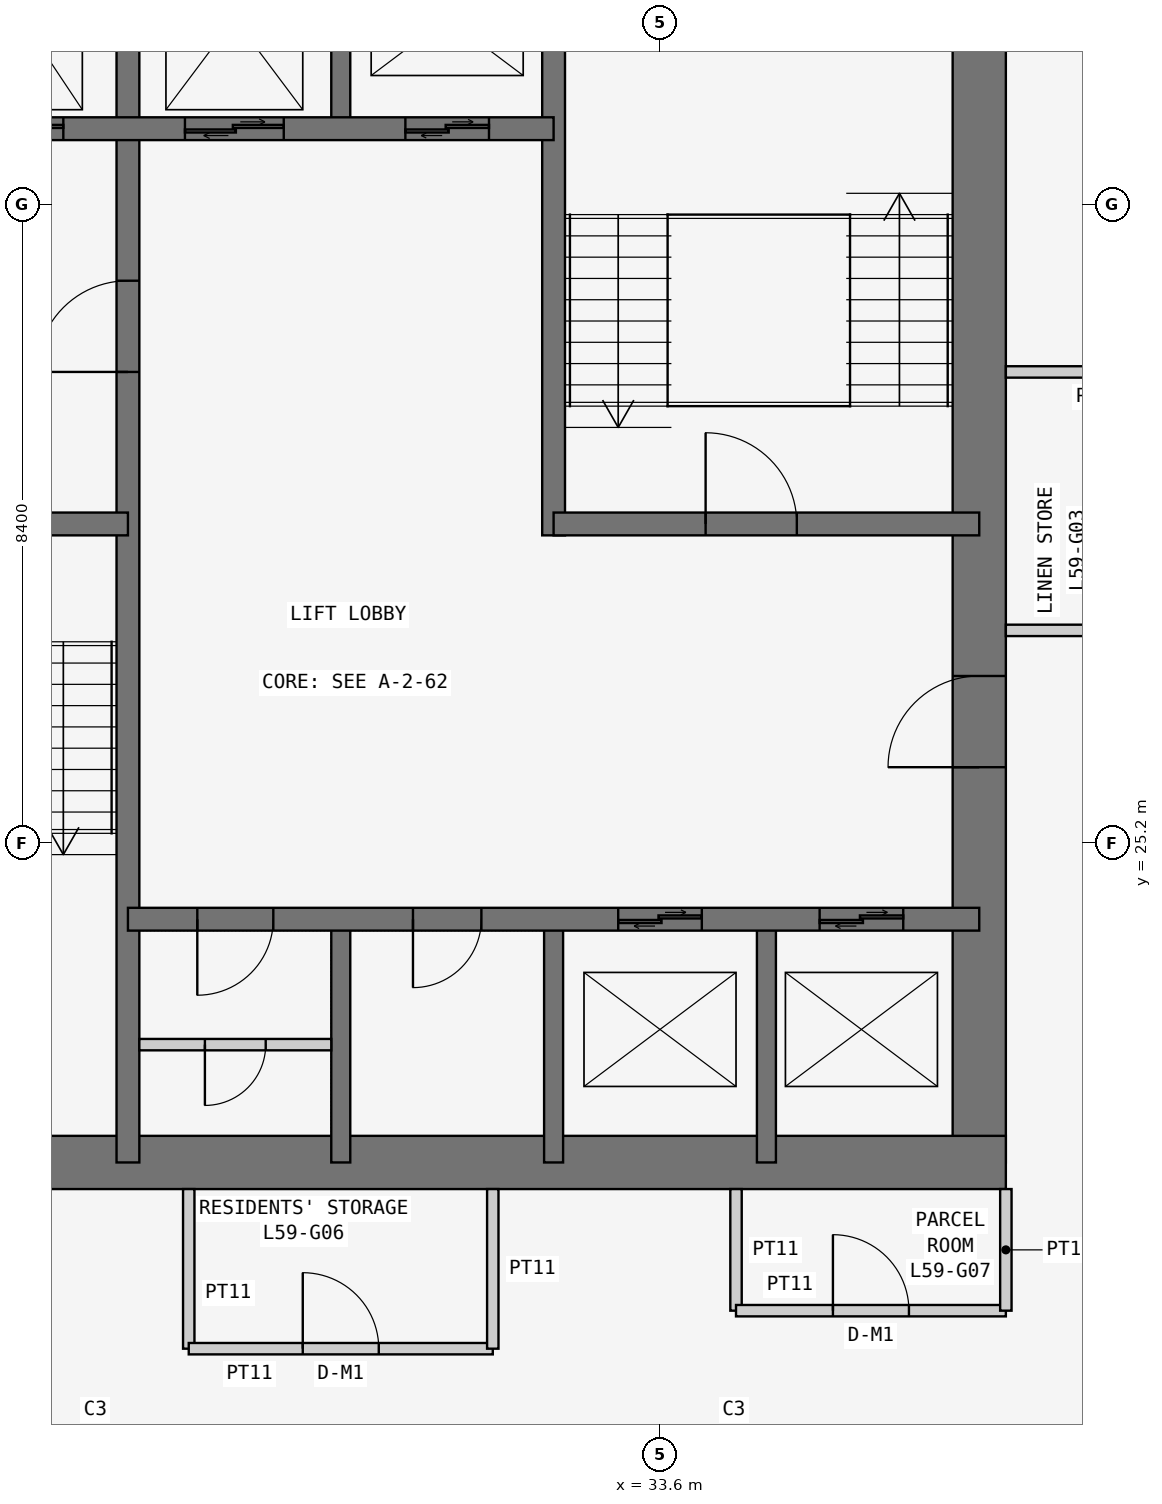
"""IFC4 building model, lengths in metres.
Left out: names, types, materials, properties, quantities, classifications, styles, units other than length and angle.
Written with IfcOpenShell. Run it as: python <this file> out.ifc"""

import sys

from ifc_helpers import new_model, si_unit, direction, frame, frame_2d, origin, place, context, subcontext, project, spatial, rectangle, extrude, element, fill, save


model = new_model("IFC4")
c1 = context("Model", 3, precision=1e-05, world=origin(), true_north=direction((0.0, 1.0)))
c2 = subcontext(c1, "Body", "Model", "MODEL_VIEW")
j1 = project(units=[si_unit("LENGTHUNIT", "METRE"), si_unit("PLANEANGLEUNIT", "RADIAN")], contexts=[c1])
p1 = place(None, origin())
s1 = spatial("IfcSite", under=j1, at=p1, CompositionType="ELEMENT")
p2 = place(p1, origin())
s2 = spatial("IfcBuilding", under=s1, at=p2, CompositionType="ELEMENT")
p3 = place(p2, frame((0.0, 0.0, 226.5)))
s3 = spatial("IfcBuildingStorey", under=s2, at=p3, CompositionType="ELEMENT", Elevation=226.5)
p4 = place(p3, frame((21.0, 21.0, 0.0), z_axis=(0.0, 0.0, 1.0), x_axis=(1.0, 0.0, 0.0)))
e1 = element("IfcWall", 1, at=p4, inside=s3, PredefinedType="SHEAR", context=c2, shape_type="SweptSolid", body=[
    extrude(rectangle(XDim=17.15, YDim=0.7, at=frame_2d((8.575, 0.0))), origin(), (0.0, 0.0, 1.0), 3.6),
])
p5 = place(p3, frame((37.8, 21.0, 0.0), z_axis=(0.0, 0.0, 1.0), x_axis=(0.0, 1.0, 0.0)))
e2 = element("IfcWall", 2, at=p5, inside=s3, PredefinedType="SHEAR", context=c2, shape_type="SweptSolid", body=[
    extrude(rectangle(XDim=17.15, YDim=0.7, at=frame_2d((8.575, 0.0))), origin(), (0.0, 0.0, 1.0), 3.6),
])
p6 = place(p5, frame((5.2, 0.0, 0.0)))
e3 = element("IfcOpeningElement", 3, at=p6, cuts=e2, PredefinedType="OPENING", context=c2, shape_type="SweptSolid", body=[
    extrude(rectangle(XDim=1.2, YDim=2.1, at=frame_2d((0.6, 1.05))), frame((0.0, 0.36, 0.0), z_axis=(0.0, -1.0, 0.0), x_axis=(1.0, 0.0, 0.0)), (0.0, 0.0, 1.0), 0.72),
])
p7 = place(p3, frame((26.6, 21.0, 0.0), z_axis=(0.0, 0.0, 1.0), x_axis=(0.0, 1.0, 0.0)))
e4 = element("IfcWall", 4, at=p7, inside=s3, PredefinedType="SHEAR", context=c2, shape_type="SweptSolid", body=[
    extrude(rectangle(XDim=16.8, YDim=0.3, at=frame_2d((8.4, 0.0))), origin(), (0.0, 0.0, 1.0), 3.6),
])
p8 = place(p7, frame((10.4, 0.0, 0.0)))
e5 = element("IfcOpeningElement", 5, at=p8, cuts=e4, PredefinedType="OPENING", context=c2, shape_type="SweptSolid", body=[
    extrude(rectangle(XDim=1.2, YDim=2.1, at=frame_2d((0.6, 1.05))), frame((0.0, 0.16, 0.0), z_axis=(0.0, -1.0, 0.0), x_axis=(1.0, 0.0, 0.0)), (0.0, 0.0, 1.0), 0.32),
])
p9 = place(p3, frame((21.0, 29.4, 0.0), z_axis=(0.0, 0.0, 1.0), x_axis=(1.0, 0.0, 0.0)))
e6 = element("IfcWall", 6, at=p9, inside=s3, PredefinedType="SHEAR", context=c2, shape_type="SweptSolid", body=[
    extrude(rectangle(XDim=5.6, YDim=0.3, at=frame_2d((2.8, 0.0))), origin(), (0.0, 0.0, 1.0), 3.6),
])
p10 = place(p9, frame((2.3, 0.0, 0.0)))
e7 = element("IfcOpeningElement", 7, at=p10, cuts=e6, PredefinedType="OPENING", context=c2, shape_type="SweptSolid", body=[
    extrude(rectangle(XDim=1.2, YDim=2.1, at=frame_2d((0.6, 1.05))), frame((0.0, 0.16, 0.0), z_axis=(0.0, -1.0, 0.0), x_axis=(1.0, 0.0, 0.0)), (0.0, 0.0, 1.0), 0.32),
])
p11 = place(p3, frame((21.0, 34.6, 0.0), z_axis=(0.0, 0.0, 1.0), x_axis=(1.0, 0.0, 0.0)))
e8 = element("IfcWall", 8, at=p11, inside=s3, PredefinedType="SHEAR", context=c2, shape_type="SweptSolid", body=[
    extrude(rectangle(XDim=11.2, YDim=0.3, at=frame_2d((5.6, 0.0))), origin(), (0.0, 0.0, 1.0), 3.6),
])
p12 = place(p11, frame((9.25, 0.0, 0.0)))
e9 = element("IfcOpeningElement", 9, at=p12, cuts=e8, PredefinedType="OPENING", context=c2, shape_type="SweptSolid", body=[
    extrude(rectangle(XDim=1.1, YDim=2.1, at=frame_2d((0.55, 1.05))), frame((0.0, 0.16, 0.0), z_axis=(0.0, -1.0, 0.0), x_axis=(1.0, 0.0, 0.0)), (0.0, 0.0, 1.0), 0.32),
])
p13 = place(p11, frame((1.0, 0.0, 0.0)))
e10 = element("IfcOpeningElement", 10, at=p13, cuts=e8, PredefinedType="OPENING", context=c2, shape_type="SweptSolid", body=[
    extrude(rectangle(XDim=1.1, YDim=2.1, at=frame_2d((0.55, 1.05))), frame((0.0, 0.16, 0.0), z_axis=(0.0, -1.0, 0.0), x_axis=(1.0, 0.0, 0.0)), (0.0, 0.0, 1.0), 0.32),
])
p14 = place(p11, frame((3.65, 0.0, 0.0)))
e11 = element("IfcOpeningElement", 11, at=p14, cuts=e8, PredefinedType="OPENING", context=c2, shape_type="SweptSolid", body=[
    extrude(rectangle(XDim=1.1, YDim=2.1, at=frame_2d((0.55, 1.05))), frame((0.0, 0.16, 0.0), z_axis=(0.0, -1.0, 0.0), x_axis=(1.0, 0.0, 0.0)), (0.0, 0.0, 1.0), 0.32),
])
p15 = place(p11, frame((6.35, 0.0, 0.0)))
e12 = element("IfcOpeningElement", 12, at=p15, cuts=e8, PredefinedType="OPENING", context=c2, shape_type="SweptSolid", body=[
    extrude(rectangle(XDim=1.3, YDim=2.1, at=frame_2d((0.65, 1.05))), frame((0.0, 0.16, 0.0), z_axis=(0.0, -1.0, 0.0), x_axis=(1.0, 0.0, 0.0)), (0.0, 0.0, 1.0), 0.32),
])
p16 = place(p3, frame((26.6, 24.2, 0.0), z_axis=(0.0, 0.0, 1.0), x_axis=(1.0, 0.0, 0.0)))
e13 = element("IfcWall", 13, at=p16, inside=s3, PredefinedType="SHEAR", context=c2, shape_type="SweptSolid", body=[
    extrude(rectangle(XDim=11.2, YDim=0.3, at=frame_2d((5.6, 0.0))), origin(), (0.0, 0.0, 1.0), 3.6),
])
p17 = place(p16, frame((0.913, 0.0, 0.0)))
e14 = element("IfcOpeningElement", 14, at=p17, cuts=e13, PredefinedType="OPENING", context=c2, shape_type="SweptSolid", body=[
    extrude(rectangle(XDim=1.0, YDim=2.1, at=frame_2d((0.5, 1.05))), frame((0.0, 0.16, 0.0), z_axis=(0.0, -1.0, 0.0), x_axis=(1.0, 0.0, 0.0)), (0.0, 0.0, 1.0), 0.32),
])
p18 = place(p16, frame((3.75, 0.0, 0.0)))
e15 = element("IfcOpeningElement", 15, at=p18, cuts=e13, PredefinedType="OPENING", context=c2, shape_type="SweptSolid", body=[
    extrude(rectangle(XDim=0.9, YDim=2.1, at=frame_2d((0.45, 1.05))), frame((0.0, 0.16, 0.0), z_axis=(0.0, -1.0, 0.0), x_axis=(1.0, 0.0, 0.0)), (0.0, 0.0, 1.0), 0.32),
])
p19 = place(p16, frame((6.45, 0.0, 0.0)))
e16 = element("IfcOpeningElement", 16, at=p19, cuts=e13, PredefinedType="OPENING", context=c2, shape_type="SweptSolid", body=[
    extrude(rectangle(XDim=1.1, YDim=2.1, at=frame_2d((0.55, 1.05))), frame((0.0, 0.16, 0.0), z_axis=(0.0, -1.0, 0.0), x_axis=(1.0, 0.0, 0.0)), (0.0, 0.0, 1.0), 0.32),
])
p20 = place(p16, frame((9.1, 0.0, 0.0)))
e17 = element("IfcOpeningElement", 17, at=p20, cuts=e13, PredefinedType="OPENING", context=c2, shape_type="SweptSolid", body=[
    extrude(rectangle(XDim=1.1, YDim=2.1, at=frame_2d((0.55, 1.05))), frame((0.0, 0.16, 0.0), z_axis=(0.0, -1.0, 0.0), x_axis=(1.0, 0.0, 0.0)), (0.0, 0.0, 1.0), 0.32),
])
p21 = place(p3, frame((32.2, 29.25, 0.0), z_axis=(0.0, 0.0, 1.0), x_axis=(0.0, 1.0, 0.0)))
e18 = element("IfcWall", 18, at=p21, inside=s3, PredefinedType="SHEAR", context=c2, shape_type="SweptSolid", body=[
    extrude(rectangle(XDim=8.55, YDim=0.3, at=frame_2d((4.275, 0.0))), origin(), (0.0, 0.0, 1.0), 3.6),
])
p22 = place(p3, frame((32.2, 29.4, 0.0), z_axis=(0.0, 0.0, 1.0), x_axis=(1.0, 0.0, 0.0)))
e19 = element("IfcWall", 19, at=p22, inside=s3, PredefinedType="SHEAR", context=c2, shape_type="SweptSolid", body=[
    extrude(rectangle(XDim=5.6, YDim=0.3, at=frame_2d((2.8, 0.0))), origin(), (0.0, 0.0, 1.0), 3.6),
])
p23 = place(p22, frame((2.0, 0.0, 0.0)))
e20 = element("IfcOpeningElement", 20, at=p23, cuts=e19, PredefinedType="OPENING", context=c2, shape_type="SweptSolid", body=[
    extrude(rectangle(XDim=1.2, YDim=2.1, at=frame_2d((0.6, 1.05))), frame((0.0, 0.16, 0.0), z_axis=(0.0, -1.0, 0.0), x_axis=(1.0, 0.0, 0.0)), (0.0, 0.0, 1.0), 0.32),
])
for number, where, z_axis, x_axis in (
    (21, (29.4, 21.0, 0.0), (0.0, 0.0, 1.0), (0.0, 1.0, 0.0)),
    (22, (32.2, 21.0, 0.0), (0.0, 0.0, 1.0), (0.0, 1.0, 0.0)),
    (23, (35.0, 21.0, 0.0), (0.0, 0.0, 1.0), (0.0, 1.0, 0.0)),
    (24, (29.4, 34.6, 0.0), (0.0, 0.0, 1.0), (0.0, 1.0, 0.0)),
):
    element("IfcWall", number, at=place(p3, frame(where, z_axis=z_axis, x_axis=x_axis)), inside=s3, PredefinedType="SHEAR", context=c2, shape_type="SweptSolid", body=[
        extrude(rectangle(XDim=3.2, YDim=0.25, at=frame_2d((1.6, 0.0))), origin(), (0.0, 0.0, 1.0), 3.6),
    ])
for number, where, z_axis, x_axis in (
    (25, (38.15, 28.0, 0.0), (0.0, 0.0, 1.0), (1.0, 0.0, 0.0)),
    (26, (40.6, 31.4, 0.0), (0.0, 0.0, 1.0), (-1.0, 0.0, 0.0)),
):
    element("IfcWall", number, at=place(p3, frame(where, z_axis=z_axis, x_axis=x_axis)), inside=s3, PredefinedType="PARTITIONING", context=c2, shape_type="SweptSolid", body=[
        extrude(rectangle(XDim=2.45, YDim=0.15, at=frame_2d((1.225, 0.0))), origin(), (0.0, 0.0, 1.0), 3.45),
    ])
p24 = place(p3, frame((27.4, 20.65, 0.0), z_axis=(0.0, 0.0, 1.0), x_axis=(0.0, -1.0, 0.0)))
e27 = element("IfcWall", 27, at=p24, inside=s3, PredefinedType="PARTITIONING", context=c2, shape_type="SweptSolid", body=[
    extrude(rectangle(XDim=2.1, YDim=0.15, at=frame_2d((1.05, 0.0))), origin(), (0.0, 0.0, 1.0), 3.45),
])
p25 = place(p3, frame((27.4, 18.55, 0.0), z_axis=(0.0, 0.0, 1.0), x_axis=(1.0, 0.0, 0.0)))
e28 = element("IfcWall", 28, at=p25, inside=s3, PredefinedType="PARTITIONING", context=c2, shape_type="SweptSolid", body=[
    extrude(rectangle(XDim=4.0, YDim=0.15, at=frame_2d((2.0, 0.0))), origin(), (0.0, 0.0, 1.0), 3.45),
])
p26 = place(p25, frame((1.5, 0.0, 0.0)))
e29 = element("IfcOpeningElement", 29, at=p26, cuts=e28, PredefinedType="OPENING", context=c2, shape_type="SweptSolid", body=[
    extrude(rectangle(XDim=1.0, YDim=2.1, at=frame_2d((0.5, 1.05))), frame((0.0, 0.085, 0.0), z_axis=(0.0, -1.0, 0.0), x_axis=(1.0, 0.0, 0.0)), (0.0, 0.0, 1.0), 0.17),
])
p27 = place(p3, frame((31.4, 18.55, 0.0), z_axis=(0.0, 0.0, 1.0), x_axis=(0.0, 1.0, 0.0)))
e30 = element("IfcWall", 30, at=p27, inside=s3, PredefinedType="PARTITIONING", context=c2, shape_type="SweptSolid", body=[
    extrude(rectangle(XDim=2.1, YDim=0.15, at=frame_2d((1.05, 0.0))), origin(), (0.0, 0.0, 1.0), 3.45),
])
p28 = place(p3, frame((34.6, 20.65, 0.0), z_axis=(0.0, 0.0, 1.0), x_axis=(0.0, -1.0, 0.0)))
e31 = element("IfcWall", 31, at=p28, inside=s3, PredefinedType="PARTITIONING", context=c2, shape_type="SweptSolid", body=[
    extrude(rectangle(XDim=1.6, YDim=0.15, at=frame_2d((0.8, 0.0))), origin(), (0.0, 0.0, 1.0), 3.45),
])
p29 = place(p3, frame((34.6, 19.05, 0.0), z_axis=(0.0, 0.0, 1.0), x_axis=(1.0, 0.0, 0.0)))
e32 = element("IfcWall", 32, at=p29, inside=s3, PredefinedType="PARTITIONING", context=c2, shape_type="SweptSolid", body=[
    extrude(rectangle(XDim=3.55, YDim=0.15, at=frame_2d((1.775, 0.0))), origin(), (0.0, 0.0, 1.0), 3.45),
])
p30 = place(p29, frame((1.275, 0.0, 0.0)))
e33 = element("IfcOpeningElement", 33, at=p30, cuts=e32, PredefinedType="OPENING", context=c2, shape_type="SweptSolid", body=[
    extrude(rectangle(XDim=1.0, YDim=2.1, at=frame_2d((0.5, 1.05))), frame((0.0, 0.085, 0.0), z_axis=(0.0, -1.0, 0.0), x_axis=(1.0, 0.0, 0.0)), (0.0, 0.0, 1.0), 0.17),
])
p31 = place(p3, frame((38.15, 19.05, 0.0), z_axis=(0.0, 0.0, 1.0), x_axis=(0.0, 1.0, 0.0)))
e34 = element("IfcWall", 34, at=p31, inside=s3, PredefinedType="PARTITIONING", context=c2, shape_type="SweptSolid", body=[
    extrude(rectangle(XDim=1.6, YDim=0.15, at=frame_2d((0.8, 0.0))), origin(), (0.0, 0.0, 1.0), 3.45),
])
p32 = place(p3, frame((26.75, 22.55, 0.0), z_axis=(0.0, 0.0, 1.0), x_axis=(1.0, 0.0, 0.0)))
e35 = element("IfcWall", 35, at=p32, inside=s3, PredefinedType="PARTITIONING", context=c2, shape_type="SweptSolid", body=[
    extrude(rectangle(XDim=2.525, YDim=0.15, at=frame_2d((1.262, 0.0))), origin(), (0.0, 0.0, 1.0), 3.45),
])
p33 = place(p32, frame((0.863, 0.0, 0.0)))
e36 = element("IfcOpeningElement", 36, at=p33, cuts=e35, PredefinedType="OPENING", context=c2, shape_type="SweptSolid", body=[
    extrude(rectangle(XDim=0.8, YDim=2.1, at=frame_2d((0.4, 1.05))), frame((0.0, 0.085, 0.0), z_axis=(0.0, -1.0, 0.0), x_axis=(1.0, 0.0, 0.0)), (0.0, 0.0, 1.0), 0.17),
])
p34 = place(p26, origin())
e37 = element("IfcDoor", 37, at=p34, inside=s3, OperationType="SINGLE_SWING_LEFT", PredefinedType="DOOR", context=c2, shape_type="SweptSolid", body=[
    extrude(rectangle(XDim=1.0, YDim=2.1, at=frame_2d((0.5, 1.05))), frame((0.0, 0.025, 0.0), z_axis=(0.0, -1.0, 0.0), x_axis=(1.0, 0.0, 0.0)), (0.0, 0.0, 1.0), 0.05),
])
fill(e29, e37)
p35 = place(p30, origin())
e38 = element("IfcDoor", 38, at=p35, inside=s3, OperationType="SINGLE_SWING_LEFT", PredefinedType="DOOR", context=c2, shape_type="SweptSolid", body=[
    extrude(rectangle(XDim=1.0, YDim=2.1, at=frame_2d((0.5, 1.05))), frame((0.0, 0.025, 0.0), z_axis=(0.0, -1.0, 0.0), x_axis=(1.0, 0.0, 0.0)), (0.0, 0.0, 1.0), 0.05),
])
fill(e33, e38)
p36 = place(p8, origin())
e39 = element("IfcDoor", 39, at=p36, inside=s3, OperationType="SINGLE_SWING_LEFT", PredefinedType="DOOR", context=c2, shape_type="SweptSolid", body=[
    extrude(rectangle(XDim=1.2, YDim=2.1, at=frame_2d((0.6, 1.05))), frame((0.0, 0.025, 0.0), z_axis=(0.0, -1.0, 0.0), x_axis=(1.0, 0.0, 0.0)), (0.0, 0.0, 1.0), 0.05),
])
fill(e5, e39)
p37 = place(p6, origin())
e40 = element("IfcDoor", 40, at=p37, inside=s3, OperationType="SINGLE_SWING_LEFT", PredefinedType="DOOR", context=c2, shape_type="SweptSolid", body=[
    extrude(rectangle(XDim=1.2, YDim=2.1, at=frame_2d((0.6, 1.05))), frame((0.0, 0.025, 0.0), z_axis=(0.0, -1.0, 0.0), x_axis=(1.0, 0.0, 0.0)), (0.0, 0.0, 1.0), 0.05),
])
fill(e3, e40)
p38 = place(p23, origin())
e41 = element("IfcDoor", 41, at=p38, inside=s3, OperationType="SINGLE_SWING_LEFT", PredefinedType="DOOR", context=c2, shape_type="SweptSolid", body=[
    extrude(rectangle(XDim=1.2, YDim=2.1, at=frame_2d((0.6, 1.05))), frame((0.0, 0.025, 0.0), z_axis=(0.0, -1.0, 0.0), x_axis=(1.0, 0.0, 0.0)), (0.0, 0.0, 1.0), 0.05),
])
fill(e20, e41)
p39 = place(p17, frame((1.0, 0.0, 0.0), z_axis=(0.0, 0.0, 1.0), x_axis=(-1.0, 0.0, 0.0)))
e42 = element("IfcDoor", 42, at=p39, inside=s3, OperationType="SINGLE_SWING_RIGHT", PredefinedType="DOOR", context=c2, shape_type="SweptSolid", body=[
    extrude(rectangle(XDim=1.0, YDim=2.1, at=frame_2d((0.5, 1.05))), frame((0.0, 0.025, 0.0), z_axis=(0.0, -1.0, 0.0), x_axis=(1.0, 0.0, 0.0)), (0.0, 0.0, 1.0), 0.05),
])
fill(e14, e42)
p40 = place(p33, frame((0.8, 0.0, 0.0), z_axis=(0.0, 0.0, 1.0), x_axis=(-1.0, 0.0, 0.0)))
e43 = element("IfcDoor", 43, at=p40, inside=s3, OperationType="SINGLE_SWING_RIGHT", PredefinedType="DOOR", context=c2, shape_type="SweptSolid", body=[
    extrude(rectangle(XDim=0.8, YDim=2.1, at=frame_2d((0.4, 1.05))), frame((0.0, 0.025, 0.0), z_axis=(0.0, -1.0, 0.0), x_axis=(1.0, 0.0, 0.0)), (0.0, 0.0, 1.0), 0.05),
])
fill(e36, e43)
p41 = place(p18, frame((0.9, 0.0, 0.0), z_axis=(0.0, 0.0, 1.0), x_axis=(-1.0, 0.0, 0.0)))
e44 = element("IfcDoor", 44, at=p41, inside=s3, OperationType="SINGLE_SWING_RIGHT", PredefinedType="DOOR", context=c2, shape_type="SweptSolid", body=[
    extrude(rectangle(XDim=0.9, YDim=2.1, at=frame_2d((0.45, 1.05))), frame((0.0, 0.025, 0.0), z_axis=(0.0, -1.0, 0.0), x_axis=(1.0, 0.0, 0.0)), (0.0, 0.0, 1.0), 0.05),
])
fill(e15, e44)
p42 = place(p19, origin())
e45 = element("IfcDoor", 45, at=p42, inside=s3, OperationType="DOUBLE_DOOR_SLIDING", PredefinedType="DOOR", context=c2, shape_type="SweptSolid", body=[
    extrude(rectangle(XDim=1.1, YDim=2.1, at=frame_2d((0.55, 1.05))), frame((0.0, 0.025, 0.0), z_axis=(0.0, -1.0, 0.0), x_axis=(1.0, 0.0, 0.0)), (0.0, 0.0, 1.0), 0.05),
])
fill(e16, e45)
p43 = place(p20, origin())
e46 = element("IfcDoor", 46, at=p43, inside=s3, OperationType="DOUBLE_DOOR_SLIDING", PredefinedType="DOOR", context=c2, shape_type="SweptSolid", body=[
    extrude(rectangle(XDim=1.1, YDim=2.1, at=frame_2d((0.55, 1.05))), frame((0.0, 0.025, 0.0), z_axis=(0.0, -1.0, 0.0), x_axis=(1.0, 0.0, 0.0)), (0.0, 0.0, 1.0), 0.05),
])
fill(e17, e46)
p44 = place(p12, origin())
e47 = element("IfcDoor", 47, at=p44, inside=s3, OperationType="DOUBLE_DOOR_SLIDING", PredefinedType="DOOR", context=c2, shape_type="SweptSolid", body=[
    extrude(rectangle(XDim=1.1, YDim=2.1, at=frame_2d((0.55, 1.05))), frame((0.0, 0.025, 0.0), z_axis=(0.0, -1.0, 0.0), x_axis=(1.0, 0.0, 0.0)), (0.0, 0.0, 1.0), 0.05),
])
fill(e9, e47)
p45 = place(p14, origin())
e48 = element("IfcDoor", 48, at=p45, inside=s3, OperationType="DOUBLE_DOOR_SLIDING", PredefinedType="DOOR", context=c2, shape_type="SweptSolid", body=[
    extrude(rectangle(XDim=1.1, YDim=2.1, at=frame_2d((0.55, 1.05))), frame((0.0, 0.025, 0.0), z_axis=(0.0, -1.0, 0.0), x_axis=(1.0, 0.0, 0.0)), (0.0, 0.0, 1.0), 0.05),
])
fill(e11, e48)
p46 = place(p15, origin())
e49 = element("IfcDoor", 49, at=p46, inside=s3, OperationType="DOUBLE_DOOR_SLIDING", PredefinedType="DOOR", context=c2, shape_type="SweptSolid", body=[
    extrude(rectangle(XDim=1.3, YDim=2.1, at=frame_2d((0.65, 1.05))), frame((0.0, 0.025, 0.0), z_axis=(0.0, -1.0, 0.0), x_axis=(1.0, 0.0, 0.0)), (0.0, 0.0, 1.0), 0.05),
])
fill(e12, e49)
save(model, sys.argv[1])
